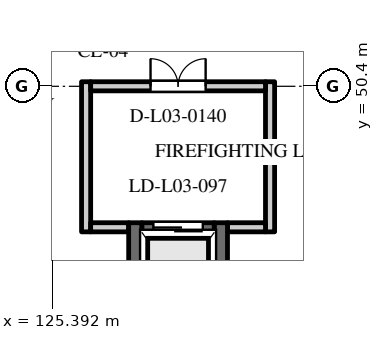
"""IFC4 building model, lengths in metres.
Left out: names, types, materials, properties, quantities, classifications, styles, units other than length and angle.
Written with IfcOpenShell. Run it as: python <this file> out.ifc"""

import sys

from ifc_helpers import new_model, si_unit, direction, frame, frame_2d, origin, place, context, subcontext, project, spatial, rectangle, extrude, element, fill, save


model = new_model("IFC4")
c1 = context("Model", 3, precision=1e-05, world=origin(), true_north=direction((0.0, 1.0)))
c2 = subcontext(c1, "Body", "Model", "MODEL_VIEW")
j1 = project(units=[si_unit("LENGTHUNIT", "METRE"), si_unit("PLANEANGLEUNIT", "RADIAN")], contexts=[c1])
p1 = place(None, origin())
s1 = spatial("IfcSite", under=j1, at=p1, CompositionType="ELEMENT")
p2 = place(p1, origin())
s2 = spatial("IfcBuilding", under=s1, at=p2, CompositionType="ELEMENT")
p3 = place(p2, frame((0.0, 0.0, 14.4)))
s3 = spatial("IfcBuildingStorey", under=s2, at=p3, CompositionType="ELEMENT", Elevation=14.4)
for number, where, z_axis, x_axis in (
    (1, (127.575, 43.06, 0.0), (0.0, 0.0, 1.0), (0.0, 1.0, 0.0)),
    (2, (129.825, 43.06, 0.0), (0.0, 0.0, 1.0), (0.0, 1.0, 0.0)),
):
    element("IfcWall", number, at=place(p3, frame(where, z_axis=z_axis, x_axis=x_axis)), inside=s3, PredefinedType="SHEAR", context=c2, shape_type="SweptSolid", body=[
        extrude(rectangle(XDim=3.75, YDim=0.35, at=frame_2d((1.875, 0.0))), origin(), (0.0, 0.0, 1.0), 3.6),
    ])
p4 = place(p3, frame((127.75, 46.635, 0.0), z_axis=(0.0, 0.0, 1.0), x_axis=(1.0, 0.0, 0.0)))
e3 = element("IfcWall", 3, at=p4, inside=s3, PredefinedType="SHEAR", context=c2, shape_type="SweptSolid", body=[
    extrude(rectangle(XDim=1.9, YDim=0.35, at=frame_2d((0.95, 0.0))), origin(), (0.0, 0.0, 1.0), 3.27),
])
p5 = place(p4, frame((0.3, 0.0, 0.0)))
e4 = element("IfcOpeningElement", 4, at=p5, cuts=e3, PredefinedType="OPENING", context=c2, shape_type="SweptSolid", body=[
    extrude(rectangle(XDim=1.3, YDim=2.2, at=frame_2d((0.65, 1.1))), frame((0.0, 0.187, 0.0), z_axis=(0.0, -1.0, 0.0), x_axis=(1.0, 0.0, 0.0)), (0.0, 0.0, 1.0), 0.374),
])
for number, where, z_axis, x_axis in (
    (5, (126.28, 46.57, 0.0), (0.0, 0.0, 1.0), (0.0, 1.0, 0.0)),
    (6, (131.12, 46.57, 0.0), (0.0, 0.0, 1.0), (0.0, 1.0, 0.0)),
):
    element("IfcWall", number, at=place(p3, frame(where, z_axis=z_axis, x_axis=x_axis)), inside=s3, PredefinedType="STANDARD", context=c2, shape_type="SweptSolid", body=[
        extrude(rectangle(XDim=3.95, YDim=0.24, at=frame_2d((1.975, 0.0))), origin(), (0.0, 0.0, 1.0), 2.77),
    ])
for number, where, z_axis, x_axis in (
    (7, (126.4, 46.69, 0.0), (0.0, 0.0, 1.0), (1.0, 0.0, 0.0)),
    (8, (130.0, 46.69, 0.0), (0.0, 0.0, 1.0), (1.0, 0.0, 0.0)),
):
    element("IfcWall", number, at=place(p3, frame(where, z_axis=z_axis, x_axis=x_axis)), inside=s3, PredefinedType="STANDARD", context=c2, shape_type="SweptSolid", body=[
        extrude(rectangle(XDim=1.0, YDim=0.24, at=frame_2d((0.5, 0.0))), origin(), (0.0, 0.0, 1.0), 2.77),
    ])
p6 = place(p3, frame((126.4, 50.4, 0.0), z_axis=(0.0, 0.0, 1.0), x_axis=(1.0, 0.0, 0.0)))
e9 = element("IfcWall", 9, at=p6, inside=s3, PredefinedType="STANDARD", context=c2, shape_type="SweptSolid", body=[
    extrude(rectangle(XDim=4.6, YDim=0.24, at=frame_2d((2.3, 0.0))), origin(), (0.0, 0.0, 1.0), 2.77),
])
p7 = place(p6, frame((1.575, 0.0, 0.0)))
e10 = element("IfcOpeningElement", 10, at=p7, cuts=e9, PredefinedType="OPENING", context=c2, shape_type="SweptSolid", body=[
    extrude(rectangle(XDim=1.45, YDim=2.2, at=frame_2d((0.725, 1.1))), frame((0.0, 0.132, 0.0), z_axis=(0.0, -1.0, 0.0), x_axis=(1.0, 0.0, 0.0)), (0.0, 0.0, 1.0), 0.264),
])
p8 = place(p5, origin())
e11 = element("IfcDoor", 11, at=p8, inside=s3, OperationType="SLIDING_TO_LEFT", PredefinedType="DOOR", context=c2, shape_type="SweptSolid", body=[
    extrude(rectangle(XDim=1.3, YDim=2.2, at=frame_2d((0.65, 1.1))), frame((0.0, 0.025, 0.0), z_axis=(0.0, -1.0, 0.0), x_axis=(1.0, 0.0, 0.0)), (0.0, 0.0, 1.0), 0.05),
])
fill(e4, e11)
p9 = place(p7, origin())
e12 = element("IfcDoor", 12, at=p9, inside=s3, OperationType="DOUBLE_DOOR_SINGLE_SWING", PredefinedType="DOOR", context=c2, shape_type="SweptSolid", body=[
    extrude(rectangle(XDim=1.45, YDim=2.2, at=frame_2d((0.725, 1.1))), frame((0.0, 0.025, 0.0), z_axis=(0.0, -1.0, 0.0), x_axis=(1.0, 0.0, 0.0)), (0.0, 0.0, 1.0), 0.05),
])
fill(e10, e12)
save(model, sys.argv[1])
